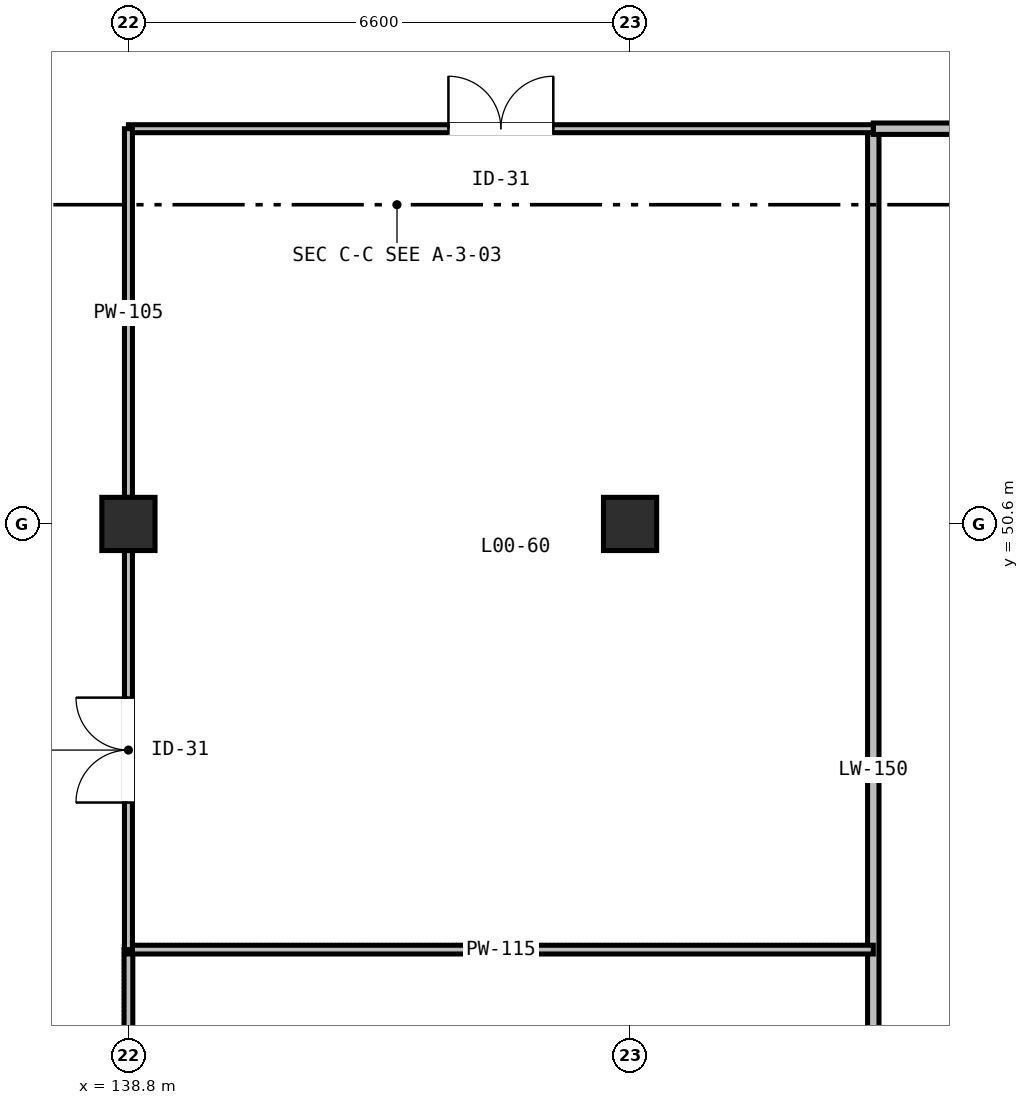
"""IFC4 building model, lengths in metres.
Left out: names, types, materials, properties, quantities, classifications, styles, units other than length and angle.
Written with IfcOpenShell. Run it as: python <this file> out.ifc"""

import sys

from ifc_helpers import new_model, si_unit, direction, frame, frame_2d, origin, origin_2d, place, context, subcontext, project, spatial, rectangle, extrude, element, fill, save


model = new_model("IFC4")
c1 = context("Model", 3, precision=1e-05, world=origin(), true_north=direction((0.0, 1.0)))
c2 = subcontext(c1, "Body", "Model", "MODEL_VIEW")
j1 = project(units=[si_unit("LENGTHUNIT", "METRE"), si_unit("PLANEANGLEUNIT", "RADIAN")], contexts=[c1])
p1 = place(None, origin())
s1 = spatial("IfcSite", under=j1, at=p1, CompositionType="ELEMENT")
p2 = place(p1, origin())
s2 = spatial("IfcBuilding", under=s1, at=p2, CompositionType="ELEMENT")
p3 = place(p2, origin())
s3 = spatial("IfcBuildingStorey", under=s2, at=p3, CompositionType="ELEMENT", Elevation=0.0)
for number, where, z_axis, x_axis in (
    (1, (138.8, 50.6, 0.0), (0.0, 0.0, 1.0), (1.0, 0.0, 0.0)),
    (2, (145.4, 50.6, 0.0), (0.0, 0.0, 1.0), (1.0, 0.0, 0.0)),
):
    element("IfcColumn", number, at=place(p3, frame(where, z_axis=z_axis, x_axis=x_axis)), inside=s3, PredefinedType="COLUMN", context=c2, shape_type="SweptSolid", body=[
        extrude(rectangle(XDim=0.7, YDim=0.7, at=origin_2d()), origin(), (0.0, 0.0, 1.0), 5.4),
    ])
p4 = place(p3, frame((148.6, 34.142, 0.0), z_axis=(0.0, 0.0, 1.0), x_axis=(0.0, 1.0, 0.0)))
e3 = element("IfcWall", 3, at=p4, inside=s3, PredefinedType="PARTITIONING", context=c2, shape_type="SweptSolid", body=[
    extrude(rectangle(XDim=21.658, YDim=0.15, at=frame_2d((10.829, 0.0))), origin(), (0.0, 0.0, 1.0), 4.735),
])
p5 = place(p3, frame((148.6, 55.8, 0.0), z_axis=(0.0, 0.0, 1.0), x_axis=(1.0, 0.0, 0.0)))
e4 = element("IfcWall", 4, at=p5, inside=s3, PredefinedType="PARTITIONING", context=c2, shape_type="SweptSolid", body=[
    extrude(rectangle(XDim=10.2, YDim=0.15, at=frame_2d((5.1, 0.0))), origin(), (0.0, 0.0, 1.0), 4.535),
])
p6 = place(p5, frame((4.6, 0.0, 0.0)))
e5 = element("IfcOpeningElement", 5, at=p6, cuts=e4, PredefinedType="OPENING", context=c2, shape_type="SweptSolid", body=[
    extrude(rectangle(XDim=1.0, YDim=2.1, at=frame_2d((0.5, 1.05))), frame((0.0, 0.085, 0.0), z_axis=(0.0, -1.0, 0.0), x_axis=(1.0, 0.0, 0.0)), (0.0, 0.0, 1.0), 0.17),
])
p7 = place(p3, frame((138.8, 42.55, 0.0), z_axis=(0.0, 0.0, 1.0), x_axis=(0.0, 1.0, 0.0)))
e6 = element("IfcWall", 6, at=p7, inside=s3, PredefinedType="PARTITIONING", context=c2, shape_type="SweptSolid", body=[
    extrude(rectangle(XDim=2.45, YDim=0.115, at=frame_2d((1.225, 0.0))), origin(), (0.0, 0.0, 1.0), 4.535),
])
p8 = place(p3, frame((138.8, 45.0, 0.0), z_axis=(0.0, 0.0, 1.0), x_axis=(1.0, 0.0, 0.0)))
e7 = element("IfcWall", 7, at=p8, inside=s3, PredefinedType="PARTITIONING", context=c2, shape_type="SweptSolid", body=[
    extrude(rectangle(XDim=9.8, YDim=0.115, at=frame_2d((4.9, 0.0))), origin(), (0.0, 0.0, 1.0), 4.535),
])
p9 = place(p3, frame((138.8, 55.8, 0.0), z_axis=(0.0, 0.0, 1.0), x_axis=(1.0, 0.0, 0.0)))
e8 = element("IfcWall", 8, at=p9, inside=s3, PredefinedType="PARTITIONING", context=c2, shape_type="SweptSolid", body=[
    extrude(rectangle(XDim=9.8, YDim=0.105, at=frame_2d((4.9, 0.0))), origin(), (0.0, 0.0, 1.0), 4.535),
])
p10 = place(p9, frame((4.21, 0.0, 0.0)))
e9 = element("IfcOpeningElement", 9, at=p10, cuts=e8, PredefinedType="OPENING", context=c2, shape_type="SweptSolid", body=[
    extrude(rectangle(XDim=1.38, YDim=2.2, at=frame_2d((0.69, 1.1))), frame((0.0, 0.062, 0.0), z_axis=(0.0, -1.0, 0.0), x_axis=(1.0, 0.0, 0.0)), (0.0, 0.0, 1.0), 0.125),
])
p11 = place(p3, frame((138.8, 45.0, 0.0), z_axis=(0.0, 0.0, 1.0), x_axis=(0.0, 1.0, 0.0)))
e10 = element("IfcWall", 10, at=p11, inside=s3, PredefinedType="PARTITIONING", context=c2, shape_type="SweptSolid", body=[
    extrude(rectangle(XDim=5.25, YDim=0.105, at=frame_2d((2.625, 0.0))), origin(), (0.0, 0.0, 1.0), 4.535),
])
p12 = place(p11, frame((1.935, 0.0, 0.0)))
e11 = element("IfcOpeningElement", 11, at=p12, cuts=e10, PredefinedType="OPENING", context=c2, shape_type="SweptSolid", body=[
    extrude(rectangle(XDim=1.38, YDim=2.2, at=frame_2d((0.69, 1.1))), frame((0.0, 0.062, 0.0), z_axis=(0.0, -1.0, 0.0), x_axis=(1.0, 0.0, 0.0)), (0.0, 0.0, 1.0), 0.125),
])
p13 = place(p3, frame((138.8, 50.95, 0.0), z_axis=(0.0, 0.0, 1.0), x_axis=(0.0, 1.0, 0.0)))
e12 = element("IfcWall", 12, at=p13, inside=s3, PredefinedType="PARTITIONING", context=c2, shape_type="SweptSolid", body=[
    extrude(rectangle(XDim=4.85, YDim=0.105, at=frame_2d((2.425, 0.0))), origin(), (0.0, 0.0, 1.0), 4.535),
])
p14 = place(p10, origin())
e13 = element("IfcDoor", 13, at=p14, inside=s3, OperationType="DOUBLE_DOOR_SINGLE_SWING", PredefinedType="DOOR", context=c2, shape_type="SweptSolid", body=[
    extrude(rectangle(XDim=1.38, YDim=2.2, at=frame_2d((0.69, 1.1))), frame((0.0, 0.025, 0.0), z_axis=(0.0, -1.0, 0.0), x_axis=(1.0, 0.0, 0.0)), (0.0, 0.0, 1.0), 0.05),
])
fill(e9, e13)
p15 = place(p12, origin())
e14 = element("IfcDoor", 14, at=p15, inside=s3, OperationType="DOUBLE_DOOR_SINGLE_SWING", PredefinedType="DOOR", context=c2, shape_type="SweptSolid", body=[
    extrude(rectangle(XDim=1.38, YDim=2.2, at=frame_2d((0.69, 1.1))), frame((0.0, 0.025, 0.0), z_axis=(0.0, -1.0, 0.0), x_axis=(1.0, 0.0, 0.0)), (0.0, 0.0, 1.0), 0.05),
])
fill(e11, e14)
save(model, sys.argv[1])
